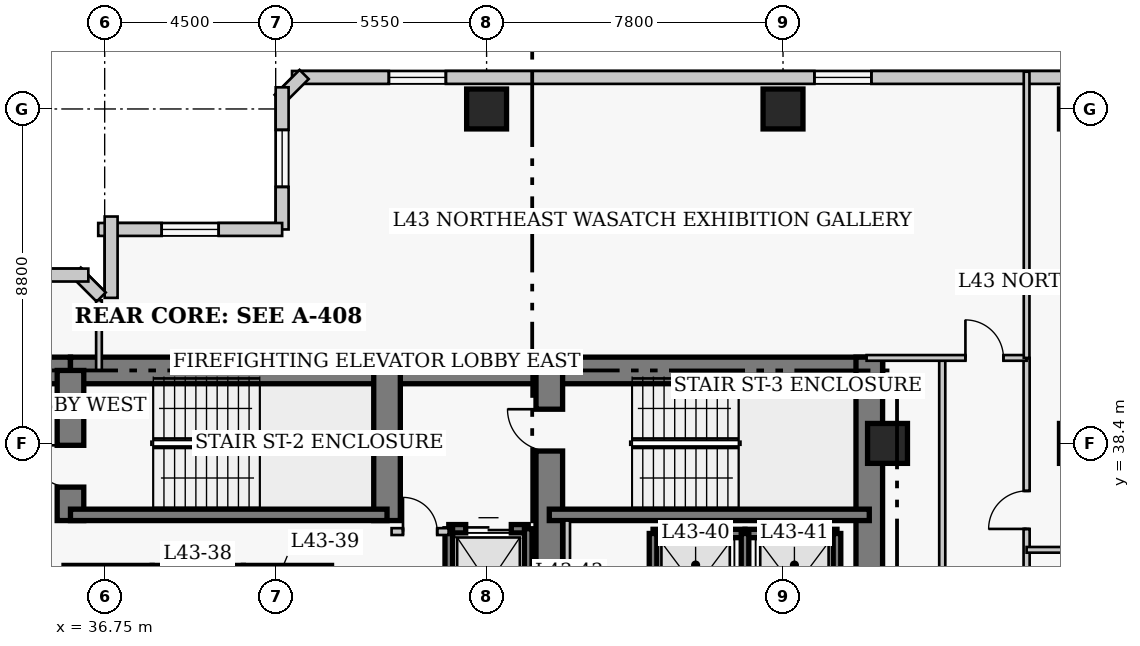
"""IFC4 building model, lengths in metres.
Left out: names, types, materials, properties, quantities, classifications, styles, units other than length and angle.
Written with IfcOpenShell. Run it as: python <this file> out.ifc"""

import sys

from ifc_helpers import new_model, si_unit, direction, frame, frame_2d, origin, origin_2d, place, context, subcontext, project, spatial, rectangle, extrude, element, fill, save


model = new_model("IFC4")
c1 = context("Model", 3, precision=1e-05, world=origin(), true_north=direction((0.0, 1.0)))
c2 = subcontext(c1, "Body", "Model", "MODEL_VIEW")
j1 = project(units=[si_unit("LENGTHUNIT", "METRE"), si_unit("PLANEANGLEUNIT", "RADIAN")], contexts=[c1])
p1 = place(None, origin())
s1 = spatial("IfcSite", under=j1, at=p1, CompositionType="ELEMENT")
p2 = place(p1, origin())
s2 = spatial("IfcBuilding", under=s1, at=p2, CompositionType="ELEMENT")
p3 = place(p2, frame((0.0, 0.0, 172.6)))
s3 = spatial("IfcBuildingStorey", under=s2, at=p3, CompositionType="ELEMENT", Elevation=172.6)
p4 = place(p3, frame((21.55, 40.32, 0.0), z_axis=(0.0, 0.0, 1.0), x_axis=(1.0, 0.0, 0.0)))
e1 = element("IfcWall", 1, at=p4, inside=s3, PredefinedType="SHEAR", context=c2, shape_type="SweptSolid", body=[
    extrude(rectangle(XDim=14.3, YDim=0.7, at=frame_2d((7.15, 0.0))), origin(), (0.0, 0.0, 1.0), 3.8),
])
p5 = place(p3, frame((35.85, 40.32, 0.0), z_axis=(0.0, 0.0, 1.0), x_axis=(1.0, 0.0, 0.0)))
e2 = element("IfcWall", 2, at=p5, inside=s3, PredefinedType="SHEAR", context=c2, shape_type="SweptSolid", body=[
    extrude(rectangle(XDim=12.6, YDim=0.7, at=frame_2d((6.3, 0.0))), origin(), (0.0, 0.0, 1.0), 3.8),
])
p6 = place(p3, frame((48.45, 40.32, 0.0), z_axis=(0.0, 0.0, 1.0), x_axis=(1.0, 0.0, 0.0)))
e3 = element("IfcWall", 3, at=p6, inside=s3, PredefinedType="SHEAR", context=c2, shape_type="SweptSolid", body=[
    extrude(rectangle(XDim=8.77, YDim=0.7, at=frame_2d((4.385, 0.0))), origin(), (0.0, 0.0, 1.0), 3.8),
])
p7 = place(p3, frame((56.87, 27.05, 0.0), z_axis=(0.0, 0.0, 1.0), x_axis=(0.0, 1.0, 0.0)))
e4 = element("IfcWall", 4, at=p7, inside=s3, PredefinedType="SHEAR", context=c2, shape_type="SweptSolid", body=[
    extrude(rectangle(XDim=13.62, YDim=0.7, at=frame_2d((6.81, 0.0))), origin(), (0.0, 0.0, 1.0), 3.8),
])
p8 = place(p3, frame((35.85, 36.37, 0.0), z_axis=(0.0, 0.0, 1.0), x_axis=(0.0, 1.0, 0.0)))
e5 = element("IfcWall", 5, at=p8, inside=s3, PredefinedType="SHEAR", context=c2, shape_type="SweptSolid", body=[
    extrude(rectangle(XDim=3.95, YDim=0.7, at=frame_2d((1.975, 0.0))), origin(), (0.0, 0.0, 1.0), 3.8),
])
p9 = place(p8, frame((0.88, 0.0, 0.0)))
e6 = element("IfcOpeningElement", 6, at=p9, cuts=e5, PredefinedType="OPENING", context=c2, shape_type="SweptSolid", body=[
    extrude(rectangle(XDim=1.1, YDim=2.15, at=frame_2d((0.55, 1.075))), frame((0.0, 0.36, 0.0), z_axis=(0.0, -1.0, 0.0), x_axis=(1.0, 0.0, 0.0)), (0.0, 0.0, 1.0), 0.72),
])
p10 = place(p3, frame((44.18, 36.37, 0.0), z_axis=(0.0, 0.0, 1.0), x_axis=(0.0, 1.0, 0.0)))
e7 = element("IfcWall", 7, at=p10, inside=s3, PredefinedType="SHEAR", context=c2, shape_type="SweptSolid", body=[
    extrude(rectangle(XDim=3.95, YDim=0.7, at=frame_2d((1.975, 0.0))), origin(), (0.0, 0.0, 1.0), 3.8),
])
p11 = place(p3, frame((48.45, 32.4, 0.0), z_axis=(0.0, 0.0, 1.0), x_axis=(0.0, 1.0, 0.0)))
e8 = element("IfcWall", 8, at=p11, inside=s3, PredefinedType="SHEAR", context=c2, shape_type="SweptSolid", body=[
    extrude(rectangle(XDim=7.92, YDim=0.7, at=frame_2d((3.96, 0.0))), origin(), (0.0, 0.0, 1.0), 3.8),
])
p12 = place(p11, frame((5.8, 0.0, 0.0)))
e9 = element("IfcOpeningElement", 9, at=p12, cuts=e8, PredefinedType="OPENING", context=c2, shape_type="SweptSolid", body=[
    extrude(rectangle(XDim=1.1, YDim=2.15, at=frame_2d((0.55, 1.075))), frame((0.0, 0.36, 0.0), z_axis=(0.0, -1.0, 0.0), x_axis=(1.0, 0.0, 0.0)), (0.0, 0.0, 1.0), 0.72),
])
p13 = place(p3, frame((35.85, 36.52, 0.0), z_axis=(0.0, 0.0, 1.0), x_axis=(1.0, 0.0, 0.0)))
e10 = element("IfcWall", 10, at=p13, inside=s3, PredefinedType="SHEAR", context=c2, shape_type="SweptSolid", body=[
    extrude(rectangle(XDim=8.33, YDim=0.3, at=frame_2d((4.165, 0.0))), origin(), (0.0, 0.0, 1.0), 3.8),
])
p14 = place(p3, frame((48.45, 36.52, 0.0), z_axis=(0.0, 0.0, 1.0), x_axis=(1.0, 0.0, 0.0)))
e11 = element("IfcWall", 11, at=p14, inside=s3, PredefinedType="SHEAR", context=c2, shape_type="SweptSolid", body=[
    extrude(rectangle(XDim=8.42, YDim=0.3, at=frame_2d((4.21, 0.0))), origin(), (0.0, 0.0, 1.0), 3.8),
])
for number, where, z_axis, x_axis in (
    (12, (46.8, 47.2, 0.0), (0.0, 0.0, 1.0), (1.0, 0.0, 0.0)),
    (13, (54.6, 47.2, 0.0), (0.0, 0.0, 1.0), (1.0, 0.0, 0.0)),
    (14, (62.4, 38.4, 0.0), (0.0, 0.0, 1.0), (1.0, 0.0, 0.0)),
    (15, (62.4, 47.2, 0.0), (0.0, 0.0, 1.0), (1.0, 0.0, 0.0)),
    (16, (57.35, 38.4, 0.0), (0.0, 0.0, 1.0), (1.0, 0.0, 0.0)),
):
    element("IfcColumn", number, at=place(p3, frame(where, z_axis=z_axis, x_axis=x_axis)), inside=s3, PredefinedType="COLUMN", context=c2, shape_type="SweptSolid", body=[
        extrude(rectangle(XDim=1.05, YDim=1.05, at=origin_2d()), origin(), (0.0, 0.0, 1.0), 3.8),
    ])
p15 = place(p3, frame((68.37, 48.03, 0.0), z_axis=(0.0, 0.0, 1.0), x_axis=(-1.0, 0.0, 0.0)))
e17 = element("IfcWall", 17, at=p15, inside=s3, PredefinedType="SOLIDWALL", context=c2, shape_type="SweptSolid", body=[
    extrude(rectangle(XDim=26.69, YDim=0.34, at=frame_2d((13.345, 0.0))), origin(), (0.0, 0.0, 1.0), 3.55),
])
p16 = place(p15, frame((3.048, 0.0, 0.85)))
e18 = element("IfcOpeningElement", 18, at=p16, cuts=e17, PredefinedType="OPENING", context=c2, shape_type="SweptSolid", body=[
    extrude(rectangle(XDim=1.5, YDim=1.75, at=frame_2d((0.75, 0.875))), frame((0.0, 0.18, 0.0), z_axis=(0.0, -1.0, 0.0), x_axis=(1.0, 0.0, 0.0)), (0.0, 0.0, 1.0), 0.36),
])
p17 = place(p15, frame((11.445, 0.0, 0.85)))
e19 = element("IfcOpeningElement", 19, at=p17, cuts=e17, PredefinedType="OPENING", context=c2, shape_type="SweptSolid", body=[
    extrude(rectangle(XDim=1.5, YDim=1.75, at=frame_2d((0.75, 0.875))), frame((0.0, 0.18, 0.0), z_axis=(0.0, -1.0, 0.0), x_axis=(1.0, 0.0, 0.0)), (0.0, 0.0, 1.0), 0.36),
])
p18 = place(p15, frame((22.642, 0.0, 0.85)))
e20 = element("IfcOpeningElement", 20, at=p18, cuts=e17, PredefinedType="OPENING", context=c2, shape_type="SweptSolid", body=[
    extrude(rectangle(XDim=1.5, YDim=1.75, at=frame_2d((0.75, 0.875))), frame((0.0, 0.18, 0.0), z_axis=(0.0, -1.0, 0.0), x_axis=(1.0, 0.0, 0.0)), (0.0, 0.0, 1.0), 0.36),
])
p19 = place(p3, frame((41.999, 48.108, 0.0), z_axis=(0.0, 0.0, 1.0), x_axis=(-0.707106781187, -0.707106781187, 0.0)))
e21 = element("IfcWall", 21, at=p19, inside=s3, PredefinedType="SOLIDWALL", context=c2, shape_type="SweptSolid", body=[
    extrude(rectangle(XDim=0.929, YDim=0.34, at=frame_2d((0.464, 0.0))), origin(), (0.0, 0.0, 1.0), 3.55),
])
p20 = place(p3, frame((41.42, 47.77, 0.0), z_axis=(0.0, 0.0, 1.0), x_axis=(0.0, -1.0, 0.0)))
e22 = element("IfcWall", 22, at=p20, inside=s3, PredefinedType="SOLIDWALL", context=c2, shape_type="SweptSolid", body=[
    extrude(rectangle(XDim=3.74, YDim=0.34, at=frame_2d((1.87, 0.0))), origin(), (0.0, 0.0, 1.0), 3.55),
])
p21 = place(p20, frame((1.12, 0.0, 0.85)))
e23 = element("IfcOpeningElement", 23, at=p21, cuts=e22, PredefinedType="OPENING", context=c2, shape_type="SweptSolid", body=[
    extrude(rectangle(XDim=1.5, YDim=1.75, at=frame_2d((0.75, 0.875))), frame((0.0, 0.18, 0.0), z_axis=(0.0, -1.0, 0.0), x_axis=(1.0, 0.0, 0.0)), (0.0, 0.0, 1.0), 0.36),
])
p22 = place(p3, frame((41.42, 44.03, 0.0), z_axis=(0.0, 0.0, 1.0), x_axis=(-1.0, 0.0, 0.0)))
e24 = element("IfcWall", 24, at=p22, inside=s3, PredefinedType="SOLIDWALL", context=c2, shape_type="SweptSolid", body=[
    extrude(rectangle(XDim=4.84, YDim=0.34, at=frame_2d((2.42, 0.0))), origin(), (0.0, 0.0, 1.0), 3.55),
])
p23 = place(p22, frame((1.67, 0.0, 0.85)))
e25 = element("IfcOpeningElement", 25, at=p23, cuts=e24, PredefinedType="OPENING", context=c2, shape_type="SweptSolid", body=[
    extrude(rectangle(XDim=1.5, YDim=1.75, at=frame_2d((0.75, 0.875))), frame((0.0, 0.18, 0.0), z_axis=(0.0, -1.0, 0.0), x_axis=(1.0, 0.0, 0.0)), (0.0, 0.0, 1.0), 0.36),
])
p24 = place(p3, frame((36.92, 44.37, 0.0), z_axis=(0.0, 0.0, 1.0), x_axis=(0.0, -1.0, 0.0)))
e26 = element("IfcWall", 26, at=p24, inside=s3, PredefinedType="SOLIDWALL", context=c2, shape_type="SweptSolid", body=[
    extrude(rectangle(XDim=2.14, YDim=0.34, at=frame_2d((1.07, 0.0))), origin(), (0.0, 0.0, 1.0), 3.55),
])
p25 = place(p3, frame((36.658, 42.251, 0.0), z_axis=(0.0, 0.0, 1.0), x_axis=(-0.707106781187, 0.707106781187, 0.0)))
e27 = element("IfcWall", 27, at=p25, inside=s3, PredefinedType="SOLIDWALL", context=c2, shape_type="SweptSolid", body=[
    extrude(rectangle(XDim=0.929, YDim=0.34, at=frame_2d((0.464, 0.0))), origin(), (0.0, 0.0, 1.0), 3.55),
])
p26 = place(p3, frame((36.32, 42.83, 0.0), z_axis=(0.0, 0.0, 1.0), x_axis=(-1.0, 0.0, 0.0)))
e28 = element("IfcWall", 28, at=p26, inside=s3, PredefinedType="SOLIDWALL", context=c2, shape_type="SweptSolid", body=[
    extrude(rectangle(XDim=26.69, YDim=0.34, at=frame_2d((13.345, 0.0))), origin(), (0.0, 0.0, 1.0), 3.55),
])
p27 = place(p26, frame((2.548, 0.0, 0.85)))
e29 = element("IfcOpeningElement", 29, at=p27, cuts=e28, PredefinedType="OPENING", context=c2, shape_type="SweptSolid", body=[
    extrude(rectangle(XDim=1.5, YDim=1.75, at=frame_2d((0.75, 0.875))), frame((0.0, 0.18, 0.0), z_axis=(0.0, -1.0, 0.0), x_axis=(1.0, 0.0, 0.0)), (0.0, 0.0, 1.0), 0.36),
])
p28 = place(p26, frame((12.595, 0.0, 0.85)))
e30 = element("IfcOpeningElement", 30, at=p28, cuts=e28, PredefinedType="OPENING", context=c2, shape_type="SweptSolid", body=[
    extrude(rectangle(XDim=1.5, YDim=1.75, at=frame_2d((0.75, 0.875))), frame((0.0, 0.18, 0.0), z_axis=(0.0, -1.0, 0.0), x_axis=(1.0, 0.0, 0.0)), (0.0, 0.0, 1.0), 0.36),
])
p29 = place(p26, frame((21.492, 0.0, 0.85)))
e31 = element("IfcOpeningElement", 31, at=p29, cuts=e28, PredefinedType="OPENING", context=c2, shape_type="SweptSolid", body=[
    extrude(rectangle(XDim=1.5, YDim=1.75, at=frame_2d((0.75, 0.875))), frame((0.0, 0.18, 0.0), z_axis=(0.0, -1.0, 0.0), x_axis=(1.0, 0.0, 0.0)), (0.0, 0.0, 1.0), 0.36),
])
p30 = place(p3, frame((35.68, 35.08, 0.0), z_axis=(0.0, 0.0, 1.0), x_axis=(1.0, 0.0, 0.0)))
e32 = element("IfcWall", 32, at=p30, inside=s3, PredefinedType="SHEAR", context=c2, shape_type="SweptSolid", body=[
    extrude(rectangle(XDim=2.32, YDim=0.22, at=frame_2d((1.16, 0.0))), origin(), (0.0, 0.0, 1.0), 3.8),
])
p31 = place(p3, frame((38.0, 35.08, 0.0), z_axis=(0.0, 0.0, 1.0), x_axis=(1.0, 0.0, 0.0)))
e33 = element("IfcWall", 33, at=p31, inside=s3, PredefinedType="SHEAR", context=c2, shape_type="SweptSolid", body=[
    extrude(rectangle(XDim=2.4, YDim=0.22, at=frame_2d((1.2, 0.0))), origin(), (0.0, 0.0, 1.0), 3.8),
])
p32 = place(p3, frame((40.4, 35.08, 0.0), z_axis=(0.0, 0.0, 1.0), x_axis=(1.0, 0.0, 0.0)))
e34 = element("IfcWall", 34, at=p32, inside=s3, PredefinedType="SHEAR", context=c2, shape_type="SweptSolid", body=[
    extrude(rectangle(XDim=2.32, YDim=0.22, at=frame_2d((1.16, 0.0))), origin(), (0.0, 0.0, 1.0), 3.8),
])
p33 = place(p3, frame((51.18, 36.03, 0.0), z_axis=(0.0, 0.0, 1.0), x_axis=(1.0, 0.0, 0.0)))
e35 = element("IfcWall", 35, at=p33, inside=s3, PredefinedType="SHEAR", context=c2, shape_type="SweptSolid", body=[
    extrude(rectangle(XDim=2.42, YDim=0.22, at=frame_2d((1.21, 0.0))), origin(), (0.0, 0.0, 1.0), 3.8),
])
p34 = place(p3, frame((51.18, 33.17, 0.0), z_axis=(0.0, 0.0, 1.0), x_axis=(0.0, 1.0, 0.0)))
e36 = element("IfcWall", 36, at=p34, inside=s3, PredefinedType="SHEAR", context=c2, shape_type="SweptSolid", body=[
    extrude(rectangle(XDim=2.86, YDim=0.2, at=frame_2d((1.43, 0.0))), origin(), (0.0, 0.0, 1.0), 3.8),
])
p35 = place(p3, frame((53.6, 36.03, 0.0), z_axis=(0.0, 0.0, 1.0), x_axis=(1.0, 0.0, 0.0)))
e37 = element("IfcWall", 37, at=p35, inside=s3, PredefinedType="SHEAR", context=c2, shape_type="SweptSolid", body=[
    extrude(rectangle(XDim=2.42, YDim=0.22, at=frame_2d((1.21, 0.0))), origin(), (0.0, 0.0, 1.0), 3.8),
])
for number, where, z_axis, x_axis in (
    (38, (53.6, 33.17, 0.0), (0.0, 0.0, 1.0), (0.0, 1.0, 0.0)),
    (39, (56.02, 33.17, 0.0), (0.0, 0.0, 1.0), (0.0, 1.0, 0.0)),
):
    element("IfcWall", number, at=place(p3, frame(where, z_axis=z_axis, x_axis=x_axis)), inside=s3, PredefinedType="SHEAR", context=c2, shape_type="SweptSolid", body=[
        extrude(rectangle(XDim=2.86, YDim=0.2, at=frame_2d((1.43, 0.0))), origin(), (0.0, 0.0, 1.0), 3.8),
    ])
p36 = place(p3, frame((45.805, 36.155, 0.0), z_axis=(0.0, 0.0, 1.0), x_axis=(1.0, 0.0, 0.0)))
e40 = element("IfcWall", 40, at=p36, inside=s3, PredefinedType="SHEAR", context=c2, shape_type="SweptSolid", body=[
    extrude(rectangle(XDim=2.09, YDim=0.22, at=frame_2d((1.045, 0.0))), origin(), (0.0, 0.0, 1.0), 3.8),
])
p37 = place(p36, frame((0.445, 0.0, 0.0)))
e41 = element("IfcOpeningElement", 41, at=p37, cuts=e40, PredefinedType="OPENING", context=c2, shape_type="SweptSolid", body=[
    extrude(rectangle(XDim=1.2, YDim=2.15, at=frame_2d((0.6, 1.075))), frame((0.0, 0.12, 0.0), z_axis=(0.0, -1.0, 0.0), x_axis=(1.0, 0.0, 0.0)), (0.0, 0.0, 1.0), 0.24),
])
p38 = place(p3, frame((45.805, 32.65, 0.0), z_axis=(0.0, 0.0, 1.0), x_axis=(0.0, 1.0, 0.0)))
e42 = element("IfcWall", 42, at=p38, inside=s3, PredefinedType="SHEAR", context=c2, shape_type="SweptSolid", body=[
    extrude(rectangle(XDim=3.505, YDim=0.2, at=frame_2d((1.752, 0.0))), origin(), (0.0, 0.0, 1.0), 3.8),
])
p39 = place(p3, frame((47.895, 33.245, 0.0), z_axis=(0.0, 0.0, 1.0), x_axis=(0.0, 1.0, 0.0)))
e43 = element("IfcWall", 43, at=p39, inside=s3, PredefinedType="SHEAR", context=c2, shape_type="SweptSolid", body=[
    extrude(rectangle(XDim=2.91, YDim=0.2, at=frame_2d((1.455, 0.0))), origin(), (0.0, 0.0, 1.0), 3.8),
])
p40 = place(p3, frame((44.3, 36.08, 0.0), z_axis=(0.0, 0.0, 1.0), x_axis=(1.0, 0.0, 0.0)))
e44 = element("IfcWall", 44, at=p40, inside=s3, PredefinedType="PARTITIONING", context=c2, shape_type="SweptSolid", body=[
    extrude(rectangle(XDim=1.5, YDim=0.18, at=frame_2d((0.75, 0.0))), origin(), (0.0, 0.0, 1.0), 3.55),
])
p41 = place(p40, frame((0.3, 0.0, 0.0)))
e45 = element("IfcOpeningElement", 45, at=p41, cuts=e44, PredefinedType="OPENING", context=c2, shape_type="SweptSolid", body=[
    extrude(rectangle(XDim=0.9, YDim=2.15, at=frame_2d((0.45, 1.075))), frame((0.0, 0.1, 0.0), z_axis=(0.0, -1.0, 0.0), x_axis=(1.0, 0.0, 0.0)), (0.0, 0.0, 1.0), 0.2),
])
p42 = place(p3, frame((48.92, 32.75, 0.0), z_axis=(0.0, 0.0, 1.0), x_axis=(0.0, 1.0, 0.0)))
e46 = element("IfcWall", 46, at=p42, inside=s3, PredefinedType="PARTITIONING", context=c2, shape_type="SweptSolid", body=[
    extrude(rectangle(XDim=3.62, YDim=0.15, at=frame_2d((1.81, 0.0))), origin(), (0.0, 0.0, 1.0), 3.55),
])
p43 = place(p3, frame((61.01, 12.05, 0.0), z_axis=(0.0, 0.0, 1.0), x_axis=(0.0, 1.0, 0.0)))
e47 = element("IfcWall", 47, at=p43, inside=s3, PredefinedType="PARTITIONING", context=c2, shape_type="SweptSolid", body=[
    extrude(rectangle(XDim=28.6, YDim=0.16, at=frame_2d((14.3, 0.0))), origin(), (0.0, 0.0, 1.0), 3.55),
])
p44 = place(p43, frame((0.925, 0.0, 0.0)))
e48 = element("IfcOpeningElement", 48, at=p44, cuts=e47, PredefinedType="OPENING", context=c2, shape_type="SweptSolid", body=[
    extrude(rectangle(XDim=0.95, YDim=2.1, at=frame_2d((0.475, 1.05))), frame((0.0, 0.09, 0.0), z_axis=(0.0, -1.0, 0.0), x_axis=(1.0, 0.0, 0.0)), (0.0, 0.0, 1.0), 0.18),
])
p45 = place(p43, frame((19.675, 0.0, 0.0)))
e49 = element("IfcOpeningElement", 49, at=p45, cuts=e47, PredefinedType="OPENING", context=c2, shape_type="SweptSolid", body=[
    extrude(rectangle(XDim=0.95, YDim=2.1, at=frame_2d((0.475, 1.05))), frame((0.0, 0.09, 0.0), z_axis=(0.0, -1.0, 0.0), x_axis=(1.0, 0.0, 0.0)), (0.0, 0.0, 1.0), 0.18),
])
p46 = place(p43, frame((24.1, 0.0, 0.0)))
e50 = element("IfcOpeningElement", 50, at=p46, cuts=e47, PredefinedType="OPENING", context=c2, shape_type="SweptSolid", body=[
    extrude(rectangle(XDim=1.0, YDim=2.15, at=frame_2d((0.5, 1.075))), frame((0.0, 0.09, 0.0), z_axis=(0.0, -1.0, 0.0), x_axis=(1.0, 0.0, 0.0)), (0.0, 0.0, 1.0), 0.18),
])
p47 = place(p3, frame((58.79, 19.16, 0.0), z_axis=(0.0, 0.0, 1.0), x_axis=(0.0, 1.0, 0.0)))
e51 = element("IfcWall", 51, at=p47, inside=s3, PredefinedType="PARTITIONING", context=c2, shape_type="SweptSolid", body=[
    extrude(rectangle(XDim=21.49, YDim=0.16, at=frame_2d((10.745, 0.0))), origin(), (0.0, 0.0, 1.0), 3.55),
])
p48 = place(p3, frame((56.8, 40.65, 0.0), z_axis=(0.0, 0.0, 1.0), x_axis=(1.0, 0.0, 0.0)))
e52 = element("IfcWall", 52, at=p48, inside=s3, PredefinedType="PARTITIONING", context=c2, shape_type="SweptSolid", body=[
    extrude(rectangle(XDim=4.21, YDim=0.15, at=frame_2d((2.105, 0.0))), origin(), (0.0, 0.0, 1.0), 3.55),
])
p49 = place(p48, frame((2.6, 0.0, 0.0)))
e53 = element("IfcOpeningElement", 53, at=p49, cuts=e52, PredefinedType="OPENING", context=c2, shape_type="SweptSolid", body=[
    extrude(rectangle(XDim=1.0, YDim=2.15, at=frame_2d((0.5, 1.075))), frame((0.0, 0.085, 0.0), z_axis=(0.0, -1.0, 0.0), x_axis=(1.0, 0.0, 0.0)), (0.0, 0.0, 1.0), 0.17),
])
p50 = place(p3, frame((36.6, 40.32, 0.0), z_axis=(0.0, 0.0, 1.0), x_axis=(0.0, 1.0, 0.0)))
e54 = element("IfcWall", 54, at=p50, inside=s3, PredefinedType="PARTITIONING", context=c2, shape_type="SweptSolid", body=[
    extrude(rectangle(XDim=1.845, YDim=0.15, at=frame_2d((0.922, 0.0))), origin(), (0.0, 0.0, 1.0), 3.55),
])
p51 = place(p3, frame((61.01, 40.65, 0.0), z_axis=(0.0, 0.0, 1.0), x_axis=(0.0, 1.0, 0.0)))
e55 = element("IfcWall", 55, at=p51, inside=s3, PredefinedType="PARTITIONING", context=c2, shape_type="SweptSolid", body=[
    extrude(rectangle(XDim=7.53, YDim=0.15, at=frame_2d((3.765, 0.0))), origin(), (0.0, 0.0, 1.0), 3.55),
])
p52 = place(p3, frame((61.01, 35.6, 0.0), z_axis=(0.0, 0.0, 1.0), x_axis=(1.0, 0.0, 0.0)))
e56 = element("IfcWall", 56, at=p52, inside=s3, PredefinedType="PARTITIONING", context=c2, shape_type="SweptSolid", body=[
    extrude(rectangle(XDim=4.09, YDim=0.15, at=frame_2d((2.045, 0.0))), origin(), (0.0, 0.0, 1.0), 3.55),
])
p53 = place(p17, origin())
e57 = element("IfcWindow", 57, at=p53, inside=s3, PartitioningType="SINGLE_PANEL", PredefinedType="WINDOW", context=c2, shape_type="SweptSolid", body=[
    extrude(rectangle(XDim=1.5, YDim=1.75, at=frame_2d((0.75, 0.875))), frame((0.0, 0.03, 0.0), z_axis=(0.0, -1.0, 0.0), x_axis=(1.0, 0.0, 0.0)), (0.0, 0.0, 1.0), 0.06),
])
fill(e19, e57)
p54 = place(p18, origin())
e58 = element("IfcWindow", 58, at=p54, inside=s3, PartitioningType="SINGLE_PANEL", PredefinedType="WINDOW", context=c2, shape_type="SweptSolid", body=[
    extrude(rectangle(XDim=1.5, YDim=1.75, at=frame_2d((0.75, 0.875))), frame((0.0, 0.03, 0.0), z_axis=(0.0, -1.0, 0.0), x_axis=(1.0, 0.0, 0.0)), (0.0, 0.0, 1.0), 0.06),
])
fill(e20, e58)
p55 = place(p21, origin())
e59 = element("IfcWindow", 59, at=p55, inside=s3, PartitioningType="SINGLE_PANEL", PredefinedType="WINDOW", context=c2, shape_type="SweptSolid", body=[
    extrude(rectangle(XDim=1.5, YDim=1.75, at=frame_2d((0.75, 0.875))), frame((0.0, 0.03, 0.0), z_axis=(0.0, -1.0, 0.0), x_axis=(1.0, 0.0, 0.0)), (0.0, 0.0, 1.0), 0.06),
])
fill(e23, e59)
p56 = place(p23, origin())
e60 = element("IfcWindow", 60, at=p56, inside=s3, PartitioningType="SINGLE_PANEL", PredefinedType="WINDOW", context=c2, shape_type="SweptSolid", body=[
    extrude(rectangle(XDim=1.5, YDim=1.75, at=frame_2d((0.75, 0.875))), frame((0.0, 0.03, 0.0), z_axis=(0.0, -1.0, 0.0), x_axis=(1.0, 0.0, 0.0)), (0.0, 0.0, 1.0), 0.06),
])
fill(e25, e60)
p57 = place(p37, origin())
e61 = element("IfcDoor", 61, at=p57, inside=s3, OperationType="DOUBLE_DOOR_SLIDING", PredefinedType="DOOR", context=c2, shape_type="SweptSolid", body=[
    extrude(rectangle(XDim=1.2, YDim=2.15, at=frame_2d((0.6, 1.075))), frame((0.0, 0.025, 0.0), z_axis=(0.0, -1.0, 0.0), x_axis=(1.0, 0.0, 0.0)), (0.0, 0.0, 1.0), 0.05),
])
fill(e41, e61)
p58 = place(p41, origin())
e62 = element("IfcDoor", 62, at=p58, inside=s3, OperationType="SINGLE_SWING_LEFT", PredefinedType="DOOR", context=c2, shape_type="SweptSolid", body=[
    extrude(rectangle(XDim=0.9, YDim=2.15, at=frame_2d((0.45, 1.075))), frame((0.0, 0.025, 0.0), z_axis=(0.0, -1.0, 0.0), x_axis=(1.0, 0.0, 0.0)), (0.0, 0.0, 1.0), 0.05),
])
fill(e45, e62)
p59 = place(p49, origin())
e63 = element("IfcDoor", 63, at=p59, inside=s3, OperationType="SINGLE_SWING_LEFT", PredefinedType="DOOR", context=c2, shape_type="SweptSolid", body=[
    extrude(rectangle(XDim=1.0, YDim=2.15, at=frame_2d((0.5, 1.075))), frame((0.0, 0.025, 0.0), z_axis=(0.0, -1.0, 0.0), x_axis=(1.0, 0.0, 0.0)), (0.0, 0.0, 1.0), 0.05),
])
fill(e53, e63)
p60 = place(p46, origin())
e64 = element("IfcDoor", 64, at=p60, inside=s3, OperationType="SINGLE_SWING_LEFT", PredefinedType="DOOR", context=c2, shape_type="SweptSolid", body=[
    extrude(rectangle(XDim=1.0, YDim=2.15, at=frame_2d((0.5, 1.075))), frame((0.0, 0.025, 0.0), z_axis=(0.0, -1.0, 0.0), x_axis=(1.0, 0.0, 0.0)), (0.0, 0.0, 1.0), 0.05),
])
fill(e50, e64)
p61 = place(p9, origin())
e65 = element("IfcDoor", 65, at=p61, inside=s3, OperationType="SINGLE_SWING_RIGHT", PredefinedType="DOOR", context=c2, shape_type="SweptSolid", body=[
    extrude(rectangle(XDim=1.1, YDim=2.15, at=frame_2d((0.55, 1.075))), frame((0.0, 0.025, 0.0), z_axis=(0.0, -1.0, 0.0), x_axis=(1.0, 0.0, 0.0)), (0.0, 0.0, 1.0), 0.05),
])
fill(e6, e65)
p62 = place(p12, origin())
e66 = element("IfcDoor", 66, at=p62, inside=s3, OperationType="SINGLE_SWING_RIGHT", PredefinedType="DOOR", context=c2, shape_type="SweptSolid", body=[
    extrude(rectangle(XDim=1.1, YDim=2.15, at=frame_2d((0.55, 1.075))), frame((0.0, 0.025, 0.0), z_axis=(0.0, -1.0, 0.0), x_axis=(1.0, 0.0, 0.0)), (0.0, 0.0, 1.0), 0.05),
])
fill(e9, e66)
save(model, sys.argv[1])
